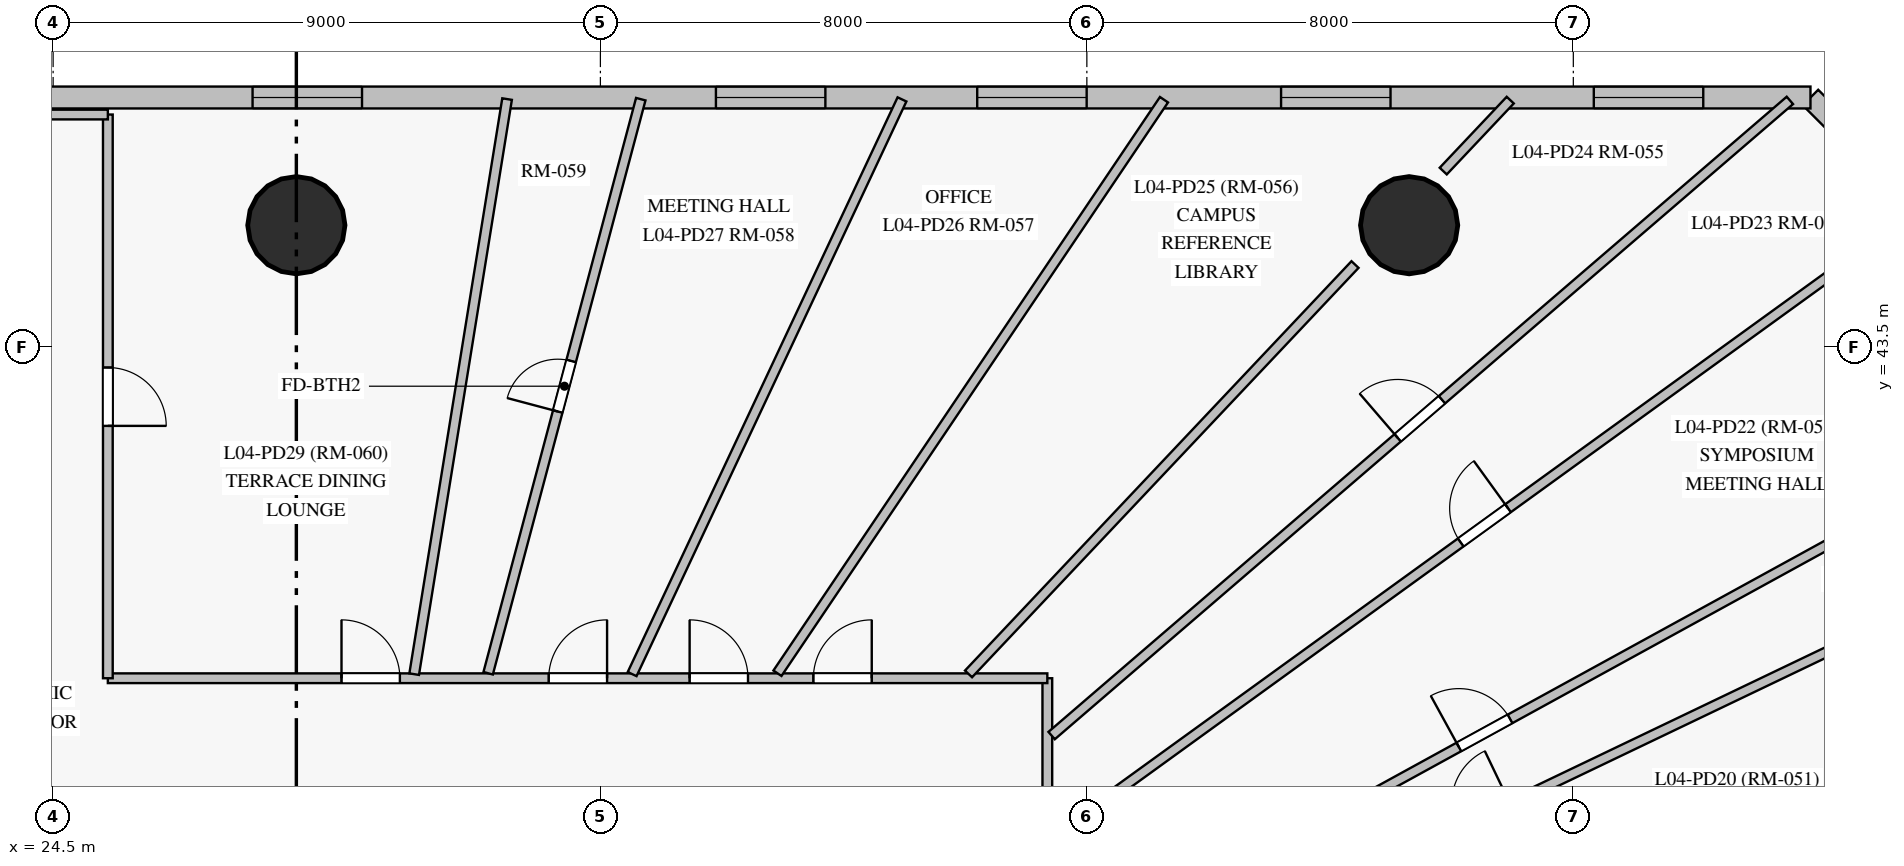
"""IFC4 building model, lengths in metres.
Left out: names, types, materials, properties, quantities, classifications, styles, units other than length and angle.
Written with IfcOpenShell. Run it as: python <this file> out.ifc"""

import sys

from ifc_helpers import new_model, si_unit, direction, frame, frame_2d, origin, origin_with_axes, origin_2d, place, context, subcontext, project, spatial, rectangle, circle, extrude, source, transform, mapped, element, fill, save


model = new_model("IFC4")
c1 = context("Model", 3, precision=1e-05, world=origin(), true_north=direction((0.0, 1.0)))
c2 = subcontext(c1, "Body", "Model", "MODEL_VIEW")
j1 = project(units=[si_unit("LENGTHUNIT", "METRE"), si_unit("PLANEANGLEUNIT", "RADIAN")], contexts=[c1])
p1 = place(None, origin())
s1 = spatial("IfcSite", under=j1, at=p1, CompositionType="ELEMENT")
p2 = place(p1, origin())
s2 = spatial("IfcBuilding", under=s1, at=p2, CompositionType="ELEMENT")
p3 = place(p2, frame((0.0, 0.0, 18.0)))
s3 = spatial("IfcBuildingStorey", under=s2, at=p3, CompositionType="ELEMENT", Elevation=18.0)
m1 = source(origin_with_axes(), c2, "Body", "SweptSolid", [
    extrude(circle(Radius=0.8, at=origin_2d()), origin(), (0.0, 0.0, 1.0), 4.5),
])
for number, where, z_axis, x_axis in (
    (1, (28.5, 45.5, 0.0), (0.0, 0.0, 1.0), (1.0, 0.0, 0.0)),
    (2, (46.8, 45.5, 0.0), (0.0, 0.0, 1.0), (1.0, 0.0, 0.0)),
):
    element("IfcColumn", number, at=place(p3, frame(where, z_axis=z_axis, x_axis=x_axis)), inside=s3, PredefinedType="COLUMN", context=c2, shape_type="MappedRepresentation", body=[
        mapped(m1, transform((0.0, 0.0, 0.0), scale=1.0)),
    ])
p4 = place(p3, frame((55.2, 45.8, 0.0), z_axis=(0.0, 0.0, 1.0), x_axis=(-0.707106781187, 0.707106781187, 0.0)))
e3 = element("IfcWall", 3, at=p4, inside=s3, PredefinedType="SOLIDWALL", context=c2, shape_type="SweptSolid", body=[
    extrude(rectangle(XDim=2.546, YDim=0.36, at=frame_2d((1.273, 0.0))), origin(), (0.0, 0.0, 1.0), 4.225),
])
p5 = place(p3, frame((53.4, 47.6, 0.0), z_axis=(0.0, 0.0, 1.0), x_axis=(-1.0, 0.0, 0.0)))
e4 = element("IfcWall", 4, at=p5, inside=s3, PredefinedType="SOLIDWALL", context=c2, shape_type="SweptSolid", body=[
    extrude(rectangle(XDim=44.3, YDim=0.36, at=frame_2d((22.15, 0.0))), origin(), (0.0, 0.0, 1.0), 4.225),
])
p6 = place(p5, frame((1.763, 0.0, 0.85)))
e5 = element("IfcOpeningElement", 5, at=p6, cuts=e4, PredefinedType="OPENING", context=c2, shape_type="SweptSolid", body=[
    extrude(rectangle(XDim=1.8, YDim=2.2, at=frame_2d((0.9, 1.1))), frame((0.0, 0.19, 0.0), z_axis=(0.0, -1.0, 0.0), x_axis=(1.0, 0.0, 0.0)), (0.0, 0.0, 1.0), 0.38),
])
p7 = place(p5, frame((6.906, 0.0, 0.85)))
e6 = element("IfcOpeningElement", 6, at=p7, cuts=e4, PredefinedType="OPENING", context=c2, shape_type="SweptSolid", body=[
    extrude(rectangle(XDim=1.8, YDim=2.2, at=frame_2d((0.9, 1.1))), frame((0.0, 0.19, 0.0), z_axis=(0.0, -1.0, 0.0), x_axis=(1.0, 0.0, 0.0)), (0.0, 0.0, 1.0), 0.38),
])
p8 = place(p5, frame((11.903, 0.0, 0.85)))
e7 = element("IfcOpeningElement", 7, at=p8, cuts=e4, PredefinedType="OPENING", context=c2, shape_type="SweptSolid", body=[
    extrude(rectangle(XDim=1.8, YDim=2.2, at=frame_2d((0.9, 1.1))), frame((0.0, 0.19, 0.0), z_axis=(0.0, -1.0, 0.0), x_axis=(1.0, 0.0, 0.0)), (0.0, 0.0, 1.0), 0.38),
])
p9 = place(p5, frame((16.2, 0.0, 0.85)))
e8 = element("IfcOpeningElement", 8, at=p9, cuts=e4, PredefinedType="OPENING", context=c2, shape_type="SweptSolid", body=[
    extrude(rectangle(XDim=1.8, YDim=2.2, at=frame_2d((0.9, 1.1))), frame((0.0, 0.19, 0.0), z_axis=(0.0, -1.0, 0.0), x_axis=(1.0, 0.0, 0.0)), (0.0, 0.0, 1.0), 0.38),
])
p10 = place(p5, frame((23.82, 0.0, 0.85)))
e9 = element("IfcOpeningElement", 9, at=p10, cuts=e4, PredefinedType="OPENING", context=c2, shape_type="SweptSolid", body=[
    extrude(rectangle(XDim=1.8, YDim=2.2, at=frame_2d((0.9, 1.1))), frame((0.0, 0.19, 0.0), z_axis=(0.0, -1.0, 0.0), x_axis=(1.0, 0.0, 0.0)), (0.0, 0.0, 1.0), 0.38),
])
p11 = place(p5, frame((29.2, 0.0, 0.85)))
e10 = element("IfcOpeningElement", 10, at=p11, cuts=e4, PredefinedType="OPENING", context=c2, shape_type="SweptSolid", body=[
    extrude(rectangle(XDim=1.8, YDim=2.2, at=frame_2d((0.9, 1.1))), frame((0.0, 0.19, 0.0), z_axis=(0.0, -1.0, 0.0), x_axis=(1.0, 0.0, 0.0)), (0.0, 0.0, 1.0), 0.38),
])
p12 = place(p5, frame((34.113, 0.0, 0.85)))
e11 = element("IfcOpeningElement", 11, at=p12, cuts=e4, PredefinedType="OPENING", context=c2, shape_type="SweptSolid", body=[
    extrude(rectangle(XDim=1.8, YDim=2.2, at=frame_2d((0.9, 1.1))), frame((0.0, 0.19, 0.0), z_axis=(0.0, -1.0, 0.0), x_axis=(1.0, 0.0, 0.0)), (0.0, 0.0, 1.0), 0.38),
])
p13 = place(p5, frame((39.1, 0.0, 0.85)))
e12 = element("IfcOpeningElement", 12, at=p13, cuts=e4, PredefinedType="OPENING", context=c2, shape_type="SweptSolid", body=[
    extrude(rectangle(XDim=1.8, YDim=2.2, at=frame_2d((0.9, 1.1))), frame((0.0, 0.19, 0.0), z_axis=(0.0, -1.0, 0.0), x_axis=(1.0, 0.0, 0.0)), (0.0, 0.0, 1.0), 0.38),
])
p14 = place(p3, frame((40.85, 38.05, 0.0), z_axis=(0.0, 0.0, 1.0), x_axis=(0.0, -1.0, 0.0)))
e13 = element("IfcWall", 13, at=p14, inside=s3, PredefinedType="PARTITIONING", context=c2, shape_type="SweptSolid", body=[
    extrude(rectangle(XDim=18.508, YDim=0.16, at=frame_2d((9.254, 0.0))), origin(), (0.0, 0.0, 1.0), 2.725),
])
p15 = place(p14, frame((10.856, 0.0, 0.0)))
e14 = element("IfcOpeningElement", 14, at=p15, cuts=e13, PredefinedType="OPENING", context=c2, shape_type="SweptSolid", body=[
    extrude(rectangle(XDim=0.96, YDim=2.15, at=frame_2d((0.48, 1.075))), frame((0.0, 0.09, 0.0), z_axis=(0.0, -1.0, 0.0), x_axis=(1.0, 0.0, 0.0)), (0.0, 0.0, 1.0), 0.18),
])
p16 = place(p14, frame((8.695, 0.0, 0.0)))
e15 = element("IfcOpeningElement", 15, at=p16, cuts=e13, PredefinedType="OPENING", context=c2, shape_type="SweptSolid", body=[
    extrude(rectangle(XDim=0.96, YDim=2.15, at=frame_2d((0.48, 1.075))), frame((0.0, 0.09, 0.0), z_axis=(0.0, -1.0, 0.0), x_axis=(1.0, 0.0, 0.0)), (0.0, 0.0, 1.0), 0.18),
])
p17 = place(p14, frame((5.944, 0.0, 0.0)))
e16 = element("IfcOpeningElement", 16, at=p17, cuts=e13, PredefinedType="OPENING", context=c2, shape_type="SweptSolid", body=[
    extrude(rectangle(XDim=0.96, YDim=2.15, at=frame_2d((0.48, 1.075))), frame((0.0, 0.09, 0.0), z_axis=(0.0, -1.0, 0.0), x_axis=(1.0, 0.0, 0.0)), (0.0, 0.0, 1.0), 0.18),
])
p18 = place(p3, frame((40.932, 35.423, 0.0), z_axis=(0.0, 0.0, 1.0), x_axis=(0.810128766866, 0.586251977477, 0.0)))
e17 = element("IfcWall", 17, at=p18, inside=s3, PredefinedType="PARTITIONING", context=c2, shape_type="SweptSolid", body=[
    extrude(rectangle(XDim=17.566, YDim=0.16, at=frame_2d((8.783, 0.0))), origin(), (0.0, 0.0, 1.0), 4.225),
])
p19 = place(p18, frame((8.291, 0.0, 0.0)))
e18 = element("IfcOpeningElement", 18, at=p19, cuts=e17, PredefinedType="OPENING", context=c2, shape_type="SweptSolid", body=[
    extrude(rectangle(XDim=0.96, YDim=2.15, at=frame_2d((0.48, 1.075))), frame((0.0, 0.09, 0.0), z_axis=(0.0, -1.0, 0.0), x_axis=(1.0, 0.0, 0.0)), (0.0, 0.0, 1.0), 0.18),
])
p20 = place(p3, frame((40.932, 33.252, 0.0), z_axis=(0.0, 0.0, 1.0), x_axis=(0.876735097535, 0.480973563463, 0.0)))
e19 = element("IfcWall", 19, at=p20, inside=s3, PredefinedType="PARTITIONING", context=c2, shape_type="SweptSolid", body=[
    extrude(rectangle(XDim=16.237, YDim=0.16, at=frame_2d((8.118, 0.0))), origin(), (0.0, 0.0, 1.0), 4.225),
])
p21 = place(p20, frame((7.626, 0.0, 0.0)))
e20 = element("IfcOpeningElement", 20, at=p21, cuts=e19, PredefinedType="OPENING", context=c2, shape_type="SweptSolid", body=[
    extrude(rectangle(XDim=0.96, YDim=2.15, at=frame_2d((0.48, 1.075))), frame((0.0, 0.09, 0.0), z_axis=(0.0, -1.0, 0.0), x_axis=(1.0, 0.0, 0.0)), (0.0, 0.0, 1.0), 0.18),
])
p22 = place(p3, frame((40.921, 37.107, 0.0), z_axis=(0.0, 0.0, 1.0), x_axis=(0.758049080964, 0.65219750908, 0.0)))
e21 = element("IfcWall", 21, at=p22, inside=s3, PredefinedType="PARTITIONING", context=c2, shape_type="SweptSolid", body=[
    extrude(rectangle(XDim=16.016, YDim=0.16, at=frame_2d((8.008, 0.0))), origin(), (0.0, 0.0, 1.0), 2.725),
])
p23 = place(p22, frame((7.508, 0.0, 0.0)))
e22 = element("IfcOpeningElement", 22, at=p23, cuts=e21, PredefinedType="OPENING", context=c2, shape_type="SweptSolid", body=[
    extrude(rectangle(XDim=0.96, YDim=2.15, at=frame_2d((0.48, 1.075))), frame((0.0, 0.09, 0.0), z_axis=(0.0, -1.0, 0.0), x_axis=(1.0, 0.0, 0.0)), (0.0, 0.0, 1.0), 0.18),
])
p24 = place(p3, frame((40.918, 32.378, 0.0), z_axis=(0.0, 0.0, 1.0), x_axis=(0.901975422738, 0.431787374499, 0.0)))
e23 = element("IfcWall", 23, at=p24, inside=s3, PredefinedType="PARTITIONING", context=c2, shape_type="SweptSolid", body=[
    extrude(rectangle(XDim=15.799, YDim=0.16, at=frame_2d((7.899, 0.0))), origin(), (0.0, 0.0, 1.0), 4.225),
])
p25 = place(p24, frame((7.399, 0.0, 0.0)))
e24 = element("IfcOpeningElement", 24, at=p25, cuts=e23, PredefinedType="OPENING", context=c2, shape_type="SweptSolid", body=[
    extrude(rectangle(XDim=0.96, YDim=2.15, at=frame_2d((0.48, 1.075))), frame((0.0, 0.09, 0.0), z_axis=(0.0, -1.0, 0.0), x_axis=(1.0, 0.0, 0.0)), (0.0, 0.0, 1.0), 0.18),
])
p26 = place(p3, frame((25.4, 38.05, 0.0), z_axis=(0.0, 0.0, 1.0), x_axis=(1.0, 0.0, 0.0)))
e25 = element("IfcWall", 25, at=p26, inside=s3, PredefinedType="PARTITIONING", context=c2, shape_type="SweptSolid", body=[
    extrude(rectangle(XDim=15.45, YDim=0.16, at=frame_2d((7.725, 0.0))), origin(), (0.0, 0.0, 1.0), 4.225),
])
p27 = place(p26, frame((11.603, 0.0, 0.0)))
e26 = element("IfcOpeningElement", 26, at=p27, cuts=e25, PredefinedType="OPENING", context=c2, shape_type="SweptSolid", body=[
    extrude(rectangle(XDim=0.96, YDim=2.15, at=frame_2d((0.48, 1.075))), frame((0.0, 0.09, 0.0), z_axis=(0.0, -1.0, 0.0), x_axis=(1.0, 0.0, 0.0)), (0.0, 0.0, 1.0), 0.18),
])
p28 = place(p26, frame((9.567, 0.0, 0.0)))
e27 = element("IfcOpeningElement", 27, at=p28, cuts=e25, PredefinedType="OPENING", context=c2, shape_type="SweptSolid", body=[
    extrude(rectangle(XDim=0.96, YDim=2.15, at=frame_2d((0.48, 1.075))), frame((0.0, 0.09, 0.0), z_axis=(0.0, -1.0, 0.0), x_axis=(1.0, 0.0, 0.0)), (0.0, 0.0, 1.0), 0.18),
])
p29 = place(p26, frame((7.25, 0.0, 0.0)))
e28 = element("IfcOpeningElement", 28, at=p29, cuts=e25, PredefinedType="OPENING", context=c2, shape_type="SweptSolid", body=[
    extrude(rectangle(XDim=0.96, YDim=2.15, at=frame_2d((0.48, 1.075))), frame((0.0, 0.09, 0.0), z_axis=(0.0, -1.0, 0.0), x_axis=(1.0, 0.0, 0.0)), (0.0, 0.0, 1.0), 0.18),
])
p30 = place(p26, frame((3.843, 0.0, 0.0)))
e29 = element("IfcOpeningElement", 29, at=p30, cuts=e25, PredefinedType="OPENING", context=c2, shape_type="SweptSolid", body=[
    extrude(rectangle(XDim=0.96, YDim=2.15, at=frame_2d((0.48, 1.075))), frame((0.0, 0.09, 0.0), z_axis=(0.0, -1.0, 0.0), x_axis=(1.0, 0.0, 0.0)), (0.0, 0.0, 1.0), 0.18),
])
p31 = place(p3, frame((36.412, 38.132, 0.0), z_axis=(0.0, 0.0, 1.0), x_axis=(0.558878812171, 0.829249343266, 0.0)))
e30 = element("IfcWall", 30, at=p31, inside=s3, PredefinedType="PARTITIONING", context=c2, shape_type="SweptSolid", body=[
    extrude(rectangle(XDim=11.374, YDim=0.16, at=frame_2d((5.687, 0.0))), origin(), (0.0, 0.0, 1.0), 4.225),
])
p32 = place(p3, frame((34.022, 38.118, 0.0), z_axis=(0.0, 0.0, 1.0), x_axis=(0.425022104768, 0.905182970707, 0.0)))
e31 = element("IfcWall", 31, at=p32, inside=s3, PredefinedType="PARTITIONING", context=c2, shape_type="SweptSolid", body=[
    extrude(rectangle(XDim=10.441, YDim=0.16, at=frame_2d((5.22, 0.0))), origin(), (0.0, 0.0, 1.0), 4.225),
])
p33 = place(p3, frame((31.654, 38.132, 0.0), z_axis=(0.0, 0.0, 1.0), x_axis=(0.256922135408, 0.966432106429, 0.0)))
e32 = element("IfcWall", 32, at=p33, inside=s3, PredefinedType="PARTITIONING", context=c2, shape_type="SweptSolid", body=[
    extrude(rectangle(XDim=9.769, YDim=0.16, at=frame_2d((4.884, 0.0))), origin(), (0.0, 0.0, 1.0), 4.225),
])
p34 = place(p33, frame((4.454, 0.0, 0.0)))
e33 = element("IfcOpeningElement", 33, at=p34, cuts=e32, PredefinedType="OPENING", context=c2, shape_type="SweptSolid", body=[
    extrude(rectangle(XDim=0.86, YDim=2.04, at=frame_2d((0.43, 1.02))), frame((0.0, 0.09, 0.0), z_axis=(0.0, -1.0, 0.0), x_axis=(1.0, 0.0, 0.0)), (0.0, 0.0, 1.0), 0.18),
])
p35 = place(p3, frame((30.438, 38.117, 0.0), z_axis=(0.0, 0.0, 1.0), x_axis=(0.159512072126, 0.987195977932, 0.0)))
e34 = element("IfcWall", 34, at=p35, inside=s3, PredefinedType="PARTITIONING", context=c2, shape_type="SweptSolid", body=[
    extrude(rectangle(XDim=9.58, YDim=0.16, at=frame_2d((4.79, 0.0))), origin(), (0.0, 0.0, 1.0), 4.225),
])
p36 = place(p3, frame((25.4, 47.32, 0.0), z_axis=(0.0, 0.0, 1.0), x_axis=(0.0, -1.0, 0.0)))
e35 = element("IfcWall", 35, at=p36, inside=s3, PredefinedType="PARTITIONING", context=c2, shape_type="SweptSolid", body=[
    extrude(rectangle(XDim=9.27, YDim=0.16, at=frame_2d((4.635, 0.0))), origin(), (0.0, 0.0, 1.0), 4.225),
])
p37 = place(p36, frame((4.16, 0.0, 0.0)))
e36 = element("IfcOpeningElement", 36, at=p37, cuts=e35, PredefinedType="OPENING", context=c2, shape_type="SweptSolid", body=[
    extrude(rectangle(XDim=0.96, YDim=2.15, at=frame_2d((0.48, 1.075))), frame((0.0, 0.09, 0.0), z_axis=(0.0, -1.0, 0.0), x_axis=(1.0, 0.0, 0.0)), (0.0, 0.0, 1.0), 0.18),
])
p38 = place(p3, frame((39.554, 38.121, 0.0), z_axis=(0.0, 0.0, 1.0), x_axis=(0.686483369139, 0.727145503937, 0.0)))
e37 = element("IfcWall", 37, at=p38, inside=s3, PredefinedType="PARTITIONING", context=c2, shape_type="SweptSolid", body=[
    extrude(rectangle(XDim=9.258, YDim=0.16, at=frame_2d((4.629, 0.0))), origin(), (0.0, 0.0, 1.0), 2.725),
])
p39 = place(p3, frame((21.2, 47.32, 0.0), z_axis=(0.0, 0.0, 1.0), x_axis=(1.0, 0.0, 0.0)))
e38 = element("IfcWall", 38, at=p39, inside=s3, PredefinedType="PARTITIONING", context=c2, shape_type="SweptSolid", body=[
    extrude(rectangle(XDim=4.2, YDim=0.16, at=frame_2d((2.1, 0.0))), origin(), (0.0, 0.0, 1.0), 4.225),
])
p40 = place(p3, frame((47.361, 46.39, 0.0), z_axis=(0.0, 0.0, 1.0), x_axis=(0.686511880057, 0.727118586299, 0.0)))
e39 = element("IfcWall", 39, at=p40, inside=s3, PredefinedType="PARTITIONING", context=c2, shape_type="SweptSolid", body=[
    extrude(rectangle(XDim=1.605, YDim=0.16, at=frame_2d((0.803, 0.0))), origin(), (0.0, 0.0, 1.0), 4.225),
])
m2 = source(origin_with_axes(), c2, "Body", "SweptSolid", [
    extrude(rectangle(XDim=1.8, YDim=2.2, at=frame_2d((0.9, 1.1))), frame((0.0, 0.03, 0.0), z_axis=(0.0, -1.0, 0.0), x_axis=(1.0, 0.0, 0.0)), (0.0, 0.0, 1.0), 0.06),
])
p41 = place(p6, origin())
e40 = element("IfcWindow", 40, at=p41, inside=s3, PartitioningType="SINGLE_PANEL", PredefinedType="WINDOW", context=c2, shape_type="MappedRepresentation", body=[
    mapped(m2, transform((0.0, 0.0, 0.0), scale=1.0)),
])
fill(e5, e40)
p42 = place(p7, origin())
e41 = element("IfcWindow", 41, at=p42, inside=s3, PartitioningType="SINGLE_PANEL", PredefinedType="WINDOW", context=c2, shape_type="MappedRepresentation", body=[
    mapped(m2, transform((0.0, 0.0, 0.0), scale=1.0)),
])
fill(e6, e41)
p43 = place(p8, origin())
e42 = element("IfcWindow", 42, at=p43, inside=s3, PartitioningType="SINGLE_PANEL", PredefinedType="WINDOW", context=c2, shape_type="MappedRepresentation", body=[
    mapped(m2, transform((0.0, 0.0, 0.0), scale=1.0)),
])
fill(e7, e42)
p44 = place(p9, origin())
e43 = element("IfcWindow", 43, at=p44, inside=s3, PartitioningType="SINGLE_PANEL", PredefinedType="WINDOW", context=c2, shape_type="MappedRepresentation", body=[
    mapped(m2, transform((0.0, 0.0, 0.0), scale=1.0)),
])
fill(e8, e43)
p45 = place(p10, origin())
e44 = element("IfcWindow", 44, at=p45, inside=s3, PartitioningType="SINGLE_PANEL", PredefinedType="WINDOW", context=c2, shape_type="MappedRepresentation", body=[
    mapped(m2, transform((0.0, 0.0, 0.0), scale=1.0)),
])
fill(e9, e44)
m3 = source(origin_with_axes(), c2, "Body", "SweptSolid", [
    extrude(rectangle(XDim=0.96, YDim=2.15, at=frame_2d((0.48, 1.075))), frame((0.0, 0.025, 0.0), z_axis=(0.0, -1.0, 0.0), x_axis=(1.0, 0.0, 0.0)), (0.0, 0.0, 1.0), 0.05),
])
p46 = place(p21, origin())
e45 = element("IfcDoor", 45, at=p46, inside=s3, OperationType="SINGLE_SWING_LEFT", PredefinedType="DOOR", context=c2, shape_type="MappedRepresentation", body=[
    mapped(m3, transform((0.0, 0.0, 0.0), scale=1.0)),
])
fill(e20, e45)
p47 = place(p19, origin())
e46 = element("IfcDoor", 46, at=p47, inside=s3, OperationType="SINGLE_SWING_RIGHT", PredefinedType="DOOR", context=c2, shape_type="MappedRepresentation", body=[
    mapped(m3, transform((0.0, 0.0, 0.0), scale=1.0)),
])
fill(e18, e46)
p48 = place(p23, origin())
e47 = element("IfcDoor", 47, at=p48, inside=s3, OperationType="SINGLE_SWING_LEFT", PredefinedType="DOOR", context=c2, shape_type="MappedRepresentation", body=[
    mapped(m3, transform((0.0, 0.0, 0.0), scale=1.0)),
])
fill(e22, e47)
p49 = place(p27, origin())
e48 = element("IfcDoor", 48, at=p49, inside=s3, OperationType="SINGLE_SWING_RIGHT", PredefinedType="DOOR", context=c2, shape_type="MappedRepresentation", body=[
    mapped(m3, transform((0.0, 0.0, 0.0), scale=1.0)),
])
fill(e26, e48)
p50 = place(p28, origin())
e49 = element("IfcDoor", 49, at=p50, inside=s3, OperationType="SINGLE_SWING_LEFT", PredefinedType="DOOR", context=c2, shape_type="MappedRepresentation", body=[
    mapped(m3, transform((0.0, 0.0, 0.0), scale=1.0)),
])
fill(e27, e49)
p51 = place(p29, origin())
e50 = element("IfcDoor", 50, at=p51, inside=s3, OperationType="SINGLE_SWING_RIGHT", PredefinedType="DOOR", context=c2, shape_type="MappedRepresentation", body=[
    mapped(m3, transform((0.0, 0.0, 0.0), scale=1.0)),
])
fill(e28, e50)
p52 = place(p30, origin())
e51 = element("IfcDoor", 51, at=p52, inside=s3, OperationType="SINGLE_SWING_LEFT", PredefinedType="DOOR", context=c2, shape_type="MappedRepresentation", body=[
    mapped(m3, transform((0.0, 0.0, 0.0), scale=1.0)),
])
fill(e29, e51)
p53 = place(p37, origin())
e52 = element("IfcDoor", 52, at=p53, inside=s3, OperationType="SINGLE_SWING_RIGHT", PredefinedType="DOOR", context=c2, shape_type="MappedRepresentation", body=[
    mapped(m3, transform((0.0, 0.0, 0.0), scale=1.0)),
])
fill(e36, e52)
m4 = source(origin_with_axes(), c2, "Body", "SweptSolid", [
    extrude(rectangle(XDim=0.86, YDim=2.04, at=frame_2d((0.43, 1.02))), frame((0.0, 0.025, 0.0), z_axis=(0.0, -1.0, 0.0), x_axis=(1.0, 0.0, 0.0)), (0.0, 0.0, 1.0), 0.05),
])
p54 = place(p34, origin())
e53 = element("IfcDoor", 53, at=p54, inside=s3, OperationType="SINGLE_SWING_LEFT", PredefinedType="DOOR", context=c2, shape_type="MappedRepresentation", body=[
    mapped(m4, transform((0.0, 0.0, 0.0), scale=1.0)),
])
fill(e33, e53)
save(model, sys.argv[1])
